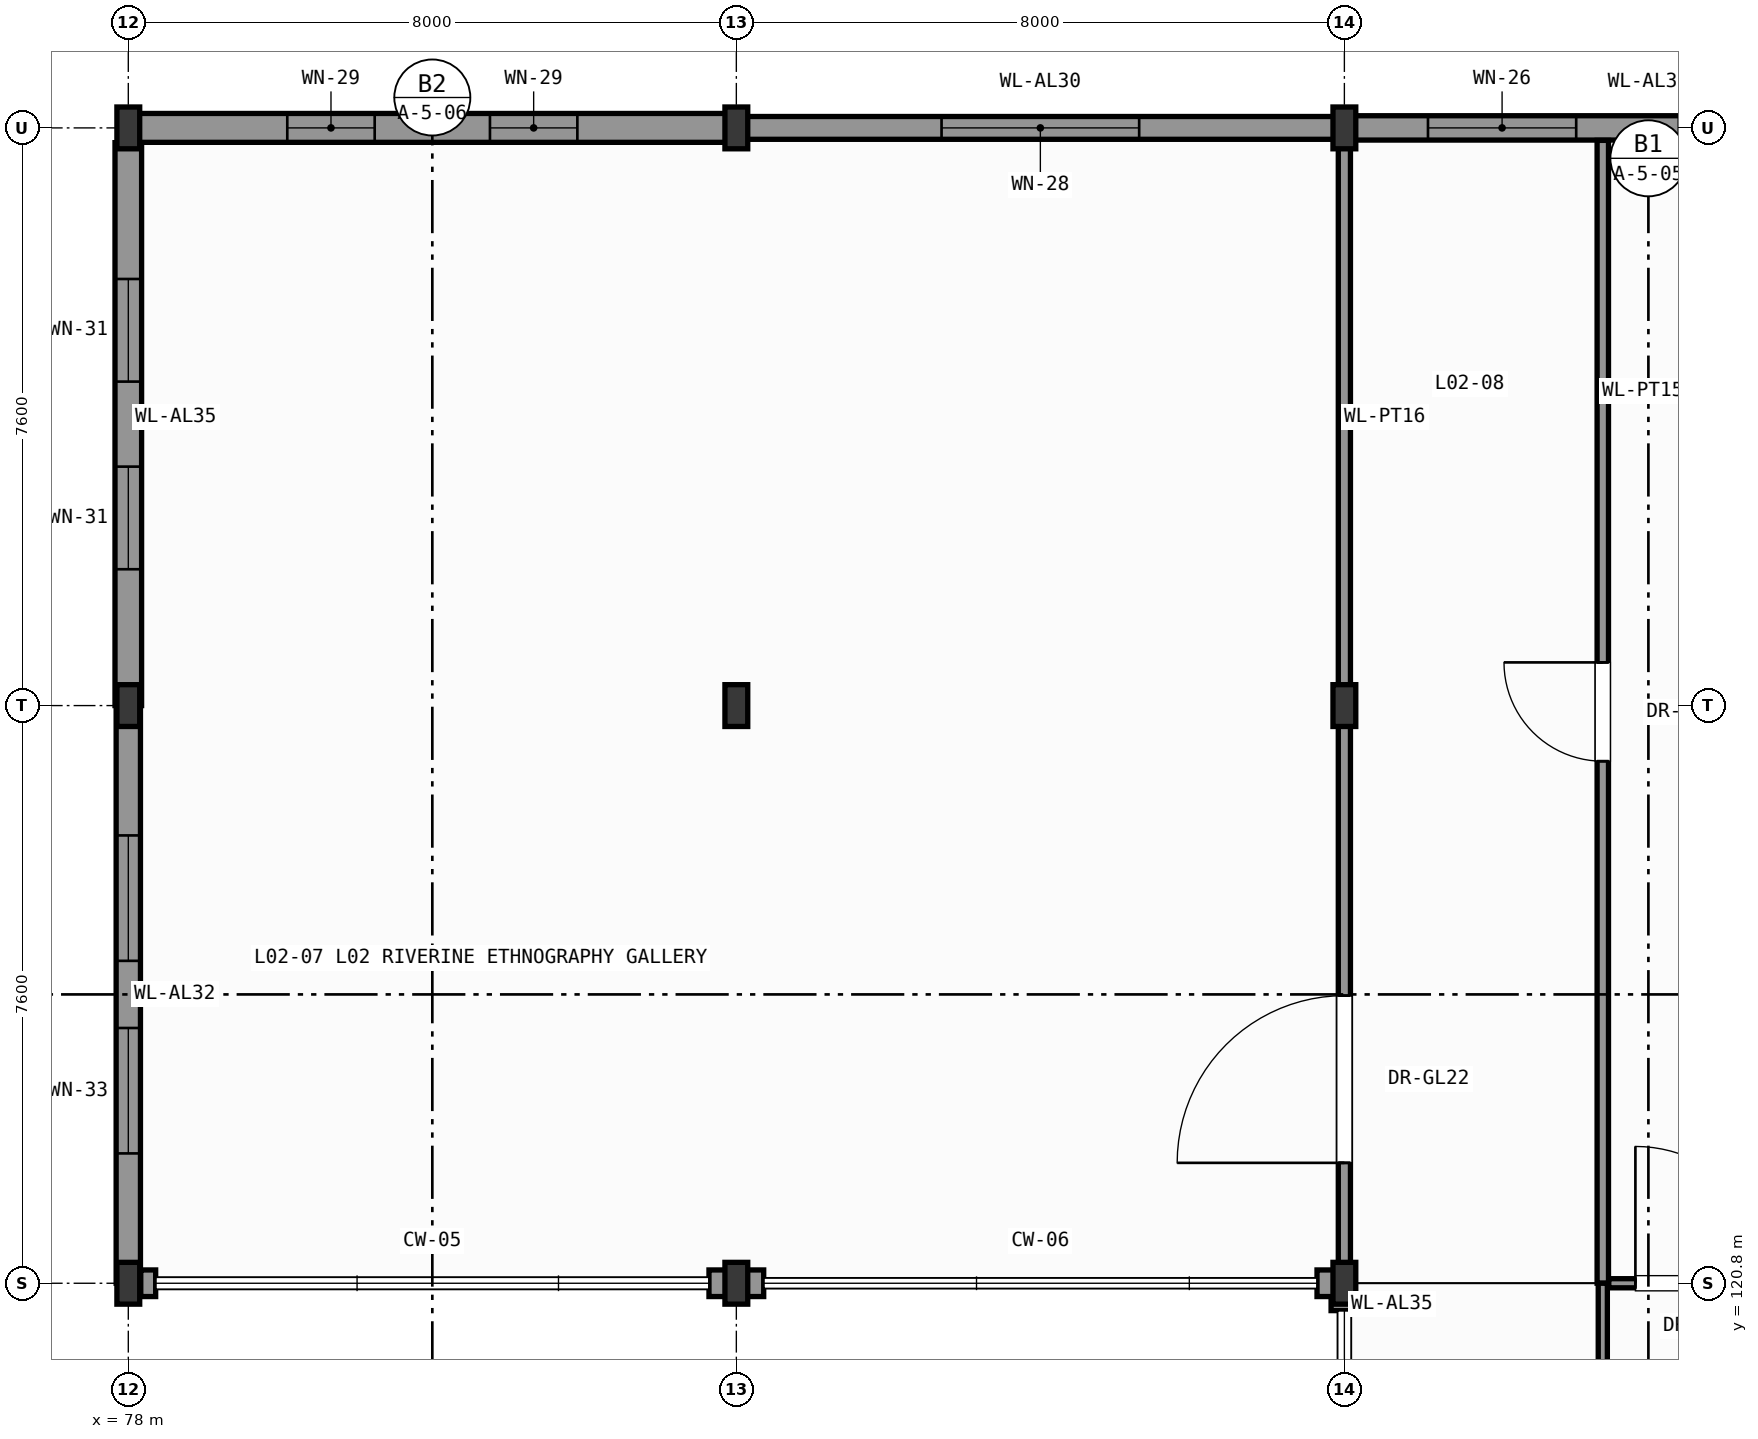
"""IFC4 building model, lengths in metres.
Left out: names, types, materials, properties, quantities, classifications, styles, units other than length and angle.
Written with IfcOpenShell. Run it as: python <this file> out.ifc"""

import sys

from ifc_helpers import new_model, si_unit, direction, frame, frame_2d, origin, origin_2d, place, context, subcontext, project, spatial, rectangle, i_section, extrude, element, fill, save


model = new_model("IFC4")
c1 = context("Model", 3, precision=1e-05, world=origin(), true_north=direction((0.0, 1.0)))
c2 = subcontext(c1, "Body", "Model", "MODEL_VIEW")
j1 = project(units=[si_unit("LENGTHUNIT", "METRE"), si_unit("PLANEANGLEUNIT", "RADIAN")], contexts=[c1])
p1 = place(None, origin())
s1 = spatial("IfcSite", under=j1, at=p1, CompositionType="ELEMENT")
p2 = place(p1, origin())
s2 = spatial("IfcBuilding", under=s1, at=p2, CompositionType="ELEMENT")
p3 = place(p2, frame((0.0, 0.0, 7.8)))
s3 = spatial("IfcBuildingStorey", under=s2, at=p3, CompositionType="ELEMENT", Elevation=7.8)
for number, where, z_axis, x_axis in (
    (1, (78.0, 120.8, 0.0), (0.0, 0.0, 1.0), (1.0, 0.0, 0.0)),
    (2, (78.0, 128.4, 0.0), (0.0, 0.0, 1.0), (1.0, 0.0, 0.0)),
    (3, (78.0, 136.0, 0.0), (0.0, 0.0, 1.0), (1.0, 0.0, 0.0)),
    (4, (86.0, 120.8, 0.0), (0.0, 0.0, 1.0), (1.0, 0.0, 0.0)),
    (5, (86.0, 128.4, 0.0), (0.0, 0.0, 1.0), (1.0, 0.0, 0.0)),
    (6, (86.0, 136.0, 0.0), (0.0, 0.0, 1.0), (1.0, 0.0, 0.0)),
    (7, (94.0, 120.8, 0.0), (0.0, 0.0, 1.0), (1.0, 0.0, 0.0)),
    (8, (94.0, 128.4, 0.0), (0.0, 0.0, 1.0), (1.0, 0.0, 0.0)),
    (9, (94.0, 136.0, 0.0), (0.0, 0.0, 1.0), (1.0, 0.0, 0.0)),
):
    element("IfcColumn", number, at=place(p3, frame(where, z_axis=z_axis, x_axis=x_axis)), inside=s3, PredefinedType="COLUMN", context=c2, shape_type="SweptSolid", body=[
        extrude(i_section(OverallWidth=0.3, OverallDepth=0.55, WebThickness=0.015, FlangeThickness=0.029, FilletRadius=0.027, at=origin_2d()), origin(), (0.0, 0.0, 1.0), 5.4),
    ])
p4 = place(p3, frame((94.0, 136.0, 0.0), z_axis=(0.0, 0.0, 1.0), x_axis=(1.0, 0.0, 0.0)))
e10 = element("IfcWall", 10, at=p4, inside=s3, PredefinedType="SOLIDWALL", context=c2, shape_type="SweptSolid", body=[
    extrude(rectangle(XDim=8.0, YDim=0.32, at=frame_2d((4.0, 0.0))), origin(), (0.0, 0.0, 1.0), 4.795),
])
p5 = place(p4, frame((1.1, 0.0, 0.95)))
e11 = element("IfcOpeningElement", 11, at=p5, cuts=e10, PredefinedType="OPENING", context=c2, shape_type="SweptSolid", body=[
    extrude(rectangle(XDim=1.95, YDim=2.55, at=frame_2d((0.975, 1.275))), frame((0.0, 0.17, 0.0), z_axis=(0.0, -1.0, 0.0), x_axis=(1.0, 0.0, 0.0)), (0.0, 0.0, 1.0), 0.34),
])
p6 = place(p4, frame((4.4, 0.0, 0.95)))
e12 = element("IfcOpeningElement", 12, at=p6, cuts=e10, PredefinedType="OPENING", context=c2, shape_type="SweptSolid", body=[
    extrude(rectangle(XDim=1.95, YDim=2.55, at=frame_2d((0.975, 1.275))), frame((0.0, 0.17, 0.0), z_axis=(0.0, -1.0, 0.0), x_axis=(1.0, 0.0, 0.0)), (0.0, 0.0, 1.0), 0.34),
])
p7 = place(p3, frame((86.0, 136.0, 0.0), z_axis=(0.0, 0.0, 1.0), x_axis=(1.0, 0.0, 0.0)))
e13 = element("IfcWall", 13, at=p7, inside=s3, PredefinedType="SOLIDWALL", context=c2, shape_type="SweptSolid", body=[
    extrude(rectangle(XDim=8.0, YDim=0.3, at=frame_2d((4.0, 0.0))), origin(), (0.0, 0.0, 1.0), 4.795),
])
p8 = place(p7, frame((2.7, 0.0, 0.95)))
e14 = element("IfcOpeningElement", 14, at=p8, cuts=e13, PredefinedType="OPENING", context=c2, shape_type="SweptSolid", body=[
    extrude(rectangle(XDim=2.6, YDim=3.45, at=frame_2d((1.3, 1.725))), frame((0.0, 0.16, 0.0), z_axis=(0.0, -1.0, 0.0), x_axis=(1.0, 0.0, 0.0)), (0.0, 0.0, 1.0), 0.32),
])
p9 = place(p3, frame((78.0, 136.0, 0.0), z_axis=(0.0, 0.0, 1.0), x_axis=(1.0, 0.0, 0.0)))
e15 = element("IfcWall", 15, at=p9, inside=s3, PredefinedType="SOLIDWALL", context=c2, shape_type="SweptSolid", body=[
    extrude(rectangle(XDim=8.0, YDim=0.38, at=frame_2d((4.0, 0.0))), origin(), (0.0, 0.0, 1.0), 4.795),
])
p10 = place(p9, frame((2.092, 0.0, 0.95)))
e16 = element("IfcOpeningElement", 16, at=p10, cuts=e15, PredefinedType="OPENING", context=c2, shape_type="SweptSolid", body=[
    extrude(rectangle(XDim=1.15, YDim=1.9, at=frame_2d((0.575, 0.95))), frame((0.0, 0.2, 0.0), z_axis=(0.0, -1.0, 0.0), x_axis=(1.0, 0.0, 0.0)), (0.0, 0.0, 1.0), 0.4),
])
p11 = place(p9, frame((4.758, 0.0, 0.95)))
e17 = element("IfcOpeningElement", 17, at=p11, cuts=e15, PredefinedType="OPENING", context=c2, shape_type="SweptSolid", body=[
    extrude(rectangle(XDim=1.15, YDim=1.9, at=frame_2d((0.575, 0.95))), frame((0.0, 0.2, 0.0), z_axis=(0.0, -1.0, 0.0), x_axis=(1.0, 0.0, 0.0)), (0.0, 0.0, 1.0), 0.4),
])
p12 = place(p3, frame((78.0, 128.4, 0.0), z_axis=(0.0, 0.0, 1.0), x_axis=(0.0, 1.0, 0.0)))
e18 = element("IfcWall", 18, at=p12, inside=s3, PredefinedType="SOLIDWALL", context=c2, shape_type="SweptSolid", body=[
    extrude(rectangle(XDim=7.406, YDim=0.35, at=frame_2d((3.703, 0.0))), origin(), (0.0, 0.0, 1.0), 4.685),
])
p13 = place(p12, frame((1.794, 0.0, 0.95)))
e19 = element("IfcOpeningElement", 19, at=p13, cuts=e18, PredefinedType="OPENING", context=c2, shape_type="SweptSolid", body=[
    extrude(rectangle(XDim=1.35, YDim=2.45, at=frame_2d((0.675, 1.225))), frame((0.0, 0.185, 0.0), z_axis=(0.0, -1.0, 0.0), x_axis=(1.0, 0.0, 0.0)), (0.0, 0.0, 1.0), 0.37),
])
p14 = place(p12, frame((4.262, 0.0, 0.95)))
e20 = element("IfcOpeningElement", 20, at=p14, cuts=e18, PredefinedType="OPENING", context=c2, shape_type="SweptSolid", body=[
    extrude(rectangle(XDim=1.35, YDim=2.45, at=frame_2d((0.675, 1.225))), frame((0.0, 0.185, 0.0), z_axis=(0.0, -1.0, 0.0), x_axis=(1.0, 0.0, 0.0)), (0.0, 0.0, 1.0), 0.37),
])
p15 = place(p3, frame((78.0, 120.8, 0.0), z_axis=(0.0, 0.0, 1.0), x_axis=(0.0, 1.0, 0.0)))
e21 = element("IfcWall", 21, at=p15, inside=s3, PredefinedType="SOLIDWALL", context=c2, shape_type="SweptSolid", body=[
    extrude(rectangle(XDim=7.6, YDim=0.32, at=frame_2d((3.8, 0.0))), origin(), (0.0, 0.0, 1.0), 4.685),
])
p16 = place(p15, frame((1.708, 0.0, 0.95)))
e22 = element("IfcOpeningElement", 22, at=p16, cuts=e21, PredefinedType="OPENING", context=c2, shape_type="SweptSolid", body=[
    extrude(rectangle(XDim=1.65, YDim=2.9, at=frame_2d((0.825, 1.45))), frame((0.0, 0.17, 0.0), z_axis=(0.0, -1.0, 0.0), x_axis=(1.0, 0.0, 0.0)), (0.0, 0.0, 1.0), 0.34),
])
p17 = place(p15, frame((4.242, 0.0, 0.95)))
e23 = element("IfcOpeningElement", 23, at=p17, cuts=e21, PredefinedType="OPENING", context=c2, shape_type="SweptSolid", body=[
    extrude(rectangle(XDim=1.65, YDim=2.9, at=frame_2d((0.825, 1.45))), frame((0.0, 0.17, 0.0), z_axis=(0.0, -1.0, 0.0), x_axis=(1.0, 0.0, 0.0)), (0.0, 0.0, 1.0), 0.34),
])
p18 = place(p3, frame((78.164, 120.8, 0.0), z_axis=(0.0, 0.0, 1.0), x_axis=(1.0, 0.0, 0.0)))
e24 = element("IfcWall", 24, at=p18, inside=s3, PredefinedType="SOLIDWALL", context=c2, shape_type="SweptSolid", body=[
    extrude(rectangle(XDim=0.196, YDim=0.35, at=frame_2d((0.098, 0.0))), origin(), (0.0, 0.0, 1.0), 5.15),
])
p19 = place(p3, frame((85.64, 120.8, 0.0), z_axis=(0.0, 0.0, 1.0), x_axis=(1.0, 0.0, 0.0)))
e25 = element("IfcWall", 25, at=p19, inside=s3, PredefinedType="SOLIDWALL", context=c2, shape_type="SweptSolid", body=[
    extrude(rectangle(XDim=0.36, YDim=0.35, at=frame_2d((0.18, 0.0))), origin(), (0.0, 0.0, 1.0), 4.685),
])
for number, where, z_axis, x_axis in (
    (26, (86.0, 120.8, 0.0), (0.0, 0.0, 1.0), (1.0, 0.0, 0.0)),
    (27, (93.64, 120.8, 0.0), (0.0, 0.0, 1.0), (1.0, 0.0, 0.0)),
):
    element("IfcWall", number, at=place(p3, frame(where, z_axis=z_axis, x_axis=x_axis)), inside=s3, PredefinedType="SOLIDWALL", context=c2, shape_type="SweptSolid", body=[
        extrude(rectangle(XDim=0.36, YDim=0.35, at=frame_2d((0.18, 0.0))), origin(), (0.0, 0.0, 1.0), 4.905),
    ])
p20 = place(p3, frame((94.0, 120.621, 0.0), z_axis=(0.0, 0.0, 1.0), x_axis=(0.0, -1.0, 0.0)))
e28 = element("IfcWall", 28, at=p20, inside=s3, PredefinedType="SOLIDWALL", context=c2, shape_type="SweptSolid", body=[
    extrude(rectangle(XDim=0.181, YDim=0.35, at=frame_2d((0.091, 0.0))), origin(), (0.0, 0.0, 1.0), 5.15),
])
p21 = place(p3, frame((94.0, 120.979, 0.0), z_axis=(0.0, 0.0, 1.0), x_axis=(0.0, 1.0, 0.0)))
e29 = element("IfcWall", 29, at=p21, inside=s3, PredefinedType="PARTITIONING", context=c2, shape_type="SweptSolid", body=[
    extrude(rectangle(XDim=14.857, YDim=0.16, at=frame_2d((7.428, 0.0))), origin(), (0.0, 0.0, 1.0), 4.685),
])
p22 = place(p21, frame((1.405, 0.0, 0.0)))
e30 = element("IfcOpeningElement", 30, at=p22, cuts=e29, PredefinedType="OPENING", context=c2, shape_type="SweptSolid", body=[
    extrude(rectangle(XDim=2.2, YDim=2.6, at=frame_2d((1.1, 1.3))), frame((0.0, 0.09, 0.0), z_axis=(0.0, -1.0, 0.0), x_axis=(1.0, 0.0, 0.0)), (0.0, 0.0, 1.0), 0.18),
])
p23 = place(p3, frame((97.4, 120.8, 0.0), z_axis=(0.0, 0.0, 1.0), x_axis=(0.0, 1.0, 0.0)))
e31 = element("IfcWall", 31, at=p23, inside=s3, PredefinedType="PARTITIONING", context=c2, shape_type="SweptSolid", body=[
    extrude(rectangle(XDim=15.036, YDim=0.15, at=frame_2d((7.518, 0.0))), origin(), (0.0, 0.0, 1.0), 5.15),
])
p24 = place(p23, frame((6.868, 0.0, 0.0)))
e32 = element("IfcOpeningElement", 32, at=p24, cuts=e31, PredefinedType="OPENING", context=c2, shape_type="SweptSolid", body=[
    extrude(rectangle(XDim=1.3, YDim=2.25, at=frame_2d((0.65, 1.125))), frame((0.0, 0.085, 0.0), z_axis=(0.0, -1.0, 0.0), x_axis=(1.0, 0.0, 0.0)), (0.0, 0.0, 1.0), 0.17),
])
p25 = place(p3, frame((97.479, 120.8, 0.0), z_axis=(0.0, 0.0, 1.0), x_axis=(1.0, 0.0, 0.0)))
e33 = element("IfcWall", 33, at=p25, inside=s3, PredefinedType="PARTITIONING", context=c2, shape_type="SweptSolid", body=[
    extrude(rectangle(XDim=4.342, YDim=0.12, at=frame_2d((2.171, 0.0))), origin(), (0.0, 0.0, 1.0), 4.865),
])
p26 = place(p25, frame((0.35, 0.0, 0.0)))
e34 = element("IfcOpeningElement", 34, at=p26, cuts=e33, PredefinedType="OPENING", context=c2, shape_type="SweptSolid", body=[
    extrude(rectangle(XDim=1.8, YDim=2.4, at=frame_2d((0.9, 1.2))), frame((0.0, 0.07, 0.0), z_axis=(0.0, -1.0, 0.0), x_axis=(1.0, 0.0, 0.0)), (0.0, 0.0, 1.0), 0.14),
])
p27 = place(p3, frame((97.4, 90.4, 0.0), z_axis=(0.0, 0.0, 1.0), x_axis=(0.0, 1.0, 0.0)))
e35 = element("IfcWall", 35, at=p27, inside=s3, PredefinedType="PARTITIONING", context=c2, shape_type="SweptSolid", body=[
    extrude(rectangle(XDim=30.4, YDim=0.12, at=frame_2d((15.2, 0.0))), origin(), (0.0, 0.0, 1.0), 5.15),
])
p28 = place(p27, frame((14.1, 0.0, 0.0)))
e36 = element("IfcOpeningElement", 36, at=p28, cuts=e35, PredefinedType="OPENING", context=c2, shape_type="SweptSolid", body=[
    extrude(rectangle(XDim=2.2, YDim=2.6, at=frame_2d((1.1, 1.3))), frame((0.0, 0.07, 0.0), z_axis=(0.0, -1.0, 0.0), x_axis=(1.0, 0.0, 0.0)), (0.0, 0.0, 1.0), 0.14),
])
p29 = place(p5, origin())
e37 = element("IfcWindow", 37, at=p29, inside=s3, PartitioningType="SINGLE_PANEL", PredefinedType="WINDOW", context=c2, shape_type="SweptSolid", body=[
    extrude(rectangle(XDim=1.95, YDim=2.55, at=frame_2d((0.975, 1.275))), frame((0.0, 0.03, 0.0), z_axis=(0.0, -1.0, 0.0), x_axis=(1.0, 0.0, 0.0)), (0.0, 0.0, 1.0), 0.06),
])
fill(e11, e37)
p30 = place(p8, origin())
e38 = element("IfcWindow", 38, at=p30, inside=s3, PartitioningType="SINGLE_PANEL", PredefinedType="WINDOW", context=c2, shape_type="SweptSolid", body=[
    extrude(rectangle(XDim=2.6, YDim=3.45, at=frame_2d((1.3, 1.725))), frame((0.0, 0.03, 0.0), z_axis=(0.0, -1.0, 0.0), x_axis=(1.0, 0.0, 0.0)), (0.0, 0.0, 1.0), 0.06),
])
fill(e14, e38)
p31 = place(p10, origin())
e39 = element("IfcWindow", 39, at=p31, inside=s3, PartitioningType="SINGLE_PANEL", PredefinedType="WINDOW", context=c2, shape_type="SweptSolid", body=[
    extrude(rectangle(XDim=1.15, YDim=1.9, at=frame_2d((0.575, 0.95))), frame((0.0, 0.03, 0.0), z_axis=(0.0, -1.0, 0.0), x_axis=(1.0, 0.0, 0.0)), (0.0, 0.0, 1.0), 0.06),
])
fill(e16, e39)
p32 = place(p11, origin())
e40 = element("IfcWindow", 40, at=p32, inside=s3, PartitioningType="SINGLE_PANEL", PredefinedType="WINDOW", context=c2, shape_type="SweptSolid", body=[
    extrude(rectangle(XDim=1.15, YDim=1.9, at=frame_2d((0.575, 0.95))), frame((0.0, 0.03, 0.0), z_axis=(0.0, -1.0, 0.0), x_axis=(1.0, 0.0, 0.0)), (0.0, 0.0, 1.0), 0.06),
])
fill(e17, e40)
p33 = place(p13, origin())
e41 = element("IfcWindow", 41, at=p33, inside=s3, PartitioningType="SINGLE_PANEL", PredefinedType="WINDOW", context=c2, shape_type="SweptSolid", body=[
    extrude(rectangle(XDim=1.35, YDim=2.45, at=frame_2d((0.675, 1.225))), frame((0.0, 0.03, 0.0), z_axis=(0.0, -1.0, 0.0), x_axis=(1.0, 0.0, 0.0)), (0.0, 0.0, 1.0), 0.06),
])
fill(e19, e41)
p34 = place(p14, origin())
e42 = element("IfcWindow", 42, at=p34, inside=s3, PartitioningType="SINGLE_PANEL", PredefinedType="WINDOW", context=c2, shape_type="SweptSolid", body=[
    extrude(rectangle(XDim=1.35, YDim=2.45, at=frame_2d((0.675, 1.225))), frame((0.0, 0.03, 0.0), z_axis=(0.0, -1.0, 0.0), x_axis=(1.0, 0.0, 0.0)), (0.0, 0.0, 1.0), 0.06),
])
fill(e20, e42)
p35 = place(p16, origin())
e43 = element("IfcWindow", 43, at=p35, inside=s3, PartitioningType="SINGLE_PANEL", PredefinedType="WINDOW", context=c2, shape_type="SweptSolid", body=[
    extrude(rectangle(XDim=1.65, YDim=2.9, at=frame_2d((0.825, 1.45))), frame((0.0, 0.03, 0.0), z_axis=(0.0, -1.0, 0.0), x_axis=(1.0, 0.0, 0.0)), (0.0, 0.0, 1.0), 0.06),
])
fill(e22, e43)
p36 = place(p17, origin())
e44 = element("IfcWindow", 44, at=p36, inside=s3, PartitioningType="SINGLE_PANEL", PredefinedType="WINDOW", context=c2, shape_type="SweptSolid", body=[
    extrude(rectangle(XDim=1.65, YDim=2.9, at=frame_2d((0.825, 1.45))), frame((0.0, 0.03, 0.0), z_axis=(0.0, -1.0, 0.0), x_axis=(1.0, 0.0, 0.0)), (0.0, 0.0, 1.0), 0.06),
])
fill(e23, e44)
p37 = place(p22, origin())
e45 = element("IfcDoor", 45, at=p37, inside=s3, OperationType="SINGLE_SWING_LEFT", PredefinedType="DOOR", context=c2, shape_type="SweptSolid", body=[
    extrude(rectangle(XDim=2.2, YDim=2.6, at=frame_2d((1.1, 1.3))), frame((0.0, 0.025, 0.0), z_axis=(0.0, -1.0, 0.0), x_axis=(1.0, 0.0, 0.0)), (0.0, 0.0, 1.0), 0.05),
])
fill(e30, e45)
p38 = place(p24, origin())
e46 = element("IfcDoor", 46, at=p38, inside=s3, OperationType="SINGLE_SWING_RIGHT", PredefinedType="DOOR", context=c2, shape_type="SweptSolid", body=[
    extrude(rectangle(XDim=1.3, YDim=2.25, at=frame_2d((0.65, 1.125))), frame((0.0, 0.025, 0.0), z_axis=(0.0, -1.0, 0.0), x_axis=(1.0, 0.0, 0.0)), (0.0, 0.0, 1.0), 0.05),
])
fill(e32, e46)
p39 = place(p26, origin())
e47 = element("IfcDoor", 47, at=p39, inside=s3, OperationType="SINGLE_SWING_LEFT", PredefinedType="DOOR", context=c2, shape_type="SweptSolid", body=[
    extrude(rectangle(XDim=1.8, YDim=2.4, at=frame_2d((0.9, 1.2))), frame((0.0, 0.025, 0.0), z_axis=(0.0, -1.0, 0.0), x_axis=(1.0, 0.0, 0.0)), (0.0, 0.0, 1.0), 0.05),
])
fill(e34, e47)
save(model, sys.argv[1])
